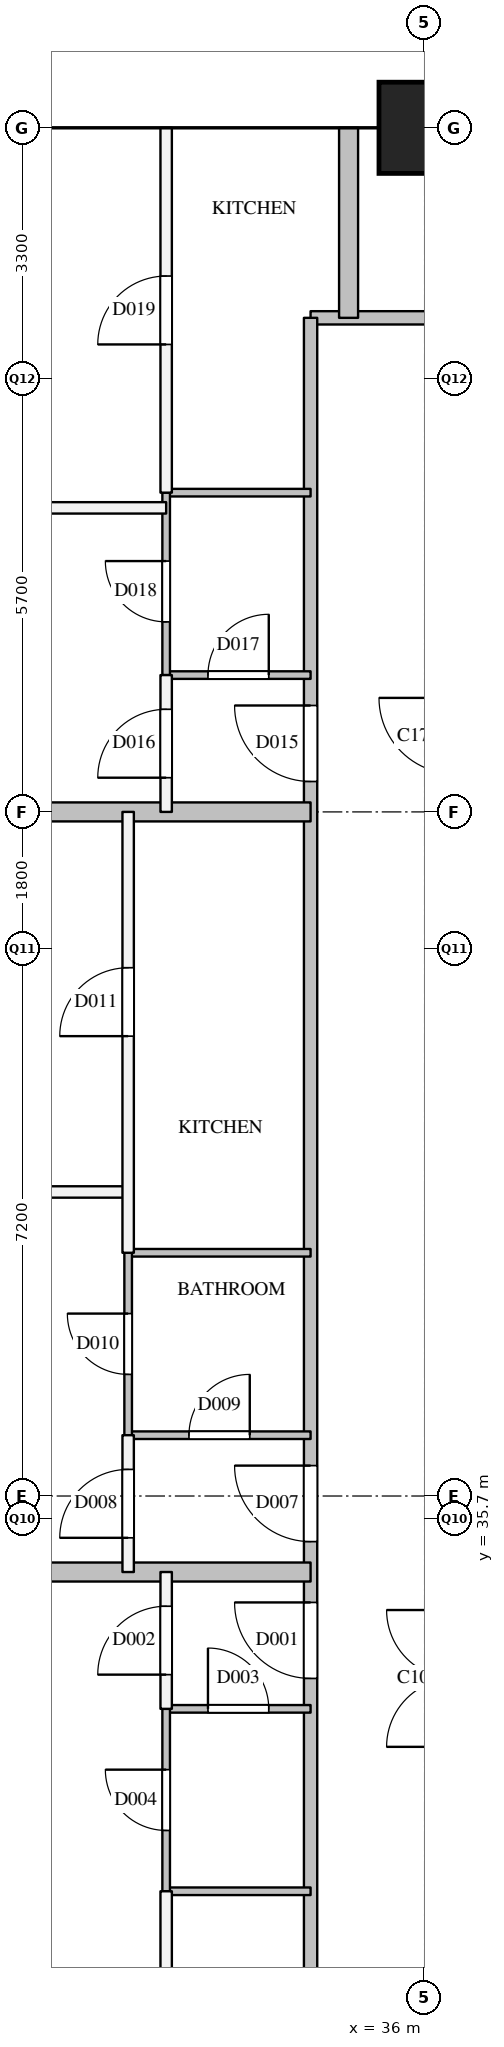
"""IFC4 building model, lengths in metres.
Left out: names, types, materials, properties, quantities, classifications, styles, units other than length and angle.
Written with IfcOpenShell. Run it as: python <this file> out.ifc"""

import sys

from ifc_helpers import new_model, si_unit, direction, frame, frame_2d, origin, origin_2d, place, context, subcontext, project, spatial, rectangle, extrude, element, fill, save


model = new_model("IFC4")
c1 = context("Model", 3, precision=1e-05, world=origin(), true_north=direction((0.0, 1.0)))
c2 = subcontext(c1, "Body", "Model", "MODEL_VIEW")
j1 = project(units=[si_unit("LENGTHUNIT", "METRE"), si_unit("PLANEANGLEUNIT", "RADIAN")], contexts=[c1])
p1 = place(None, origin())
s1 = spatial("IfcSite", under=j1, at=p1, CompositionType="ELEMENT")
p2 = place(p1, origin())
s2 = spatial("IfcBuilding", under=s1, at=p2, CompositionType="ELEMENT")
p3 = place(p2, frame((0.0, 0.0, 234.5)))
s3 = spatial("IfcBuildingStorey", under=s2, at=p3, CompositionType="ELEMENT", Elevation=234.5)
p4 = place(p3, frame((36.0, 54.0, 0.0), z_axis=(0.0, 0.0, 1.0), x_axis=(1.0, 0.0, 0.0)))
e1 = element("IfcColumn", 1, at=p4, inside=s3, PredefinedType="COLUMN", context=c2, shape_type="SweptSolid", body=[
    extrude(rectangle(XDim=1.2, YDim=1.2, at=origin_2d()), origin(), (0.0, 0.0, 1.0), 3.9),
])
p5 = place(p3, frame((34.5, 51.5, 0.0), z_axis=(0.0, 0.0, 1.0), x_axis=(1.0, 0.0, 0.0)))
e2 = element("IfcWall", 2, at=p5, inside=s3, PredefinedType="PARTITIONING", context=c2, shape_type="SweptSolid", body=[
    extrude(rectangle(XDim=15.4, YDim=0.175, at=frame_2d((7.7, 0.0))), origin(), (0.0, 0.0, 1.0), 3.6),
])
p6 = place(p5, frame((12.45, 0.0, 0.0)))
e3 = element("IfcOpeningElement", 3, at=p6, cuts=e2, PredefinedType="OPENING", context=c2, shape_type="SweptSolid", body=[
    extrude(rectangle(XDim=1.0, YDim=2.1, at=frame_2d((0.5, 1.05))), frame((0.0, 0.097, 0.0), z_axis=(0.0, -1.0, 0.0), x_axis=(1.0, 0.0, 0.0)), (0.0, 0.0, 1.0), 0.195),
])
p7 = place(p5, frame((5.05, 0.0, 0.0)))
e4 = element("IfcOpeningElement", 4, at=p7, cuts=e2, PredefinedType="OPENING", context=c2, shape_type="SweptSolid", body=[
    extrude(rectangle(XDim=0.9, YDim=2.1, at=frame_2d((0.45, 1.05))), frame((0.0, 0.097, 0.0), z_axis=(0.0, -1.0, 0.0), x_axis=(1.0, 0.0, 0.0)), (0.0, 0.0, 1.0), 0.195),
])
p8 = place(p3, frame((34.5, 28.5, 0.0), z_axis=(0.0, 0.0, 1.0), x_axis=(0.0, 1.0, 0.0)))
e5 = element("IfcWall", 5, at=p8, inside=s3, PredefinedType="PARTITIONING", context=c2, shape_type="SweptSolid", body=[
    extrude(rectangle(XDim=23.0, YDim=0.175, at=frame_2d((11.5, 0.0))), origin(), (0.0, 0.0, 1.0), 3.6),
])
p9 = place(p8, frame((5.1, 0.0, 0.0)))
e6 = element("IfcOpeningElement", 6, at=p9, cuts=e5, PredefinedType="OPENING", context=c2, shape_type="SweptSolid", body=[
    extrude(rectangle(XDim=1.0, YDim=2.1, at=frame_2d((0.5, 1.05))), frame((0.0, 0.097, 0.0), z_axis=(0.0, -1.0, 0.0), x_axis=(1.0, 0.0, 0.0)), (0.0, 0.0, 1.0), 0.195),
])
p10 = place(p8, frame((6.9, 0.0, 0.0)))
e7 = element("IfcOpeningElement", 7, at=p10, cuts=e5, PredefinedType="OPENING", context=c2, shape_type="SweptSolid", body=[
    extrude(rectangle(XDim=1.0, YDim=2.1, at=frame_2d((0.5, 1.05))), frame((0.0, 0.097, 0.0), z_axis=(0.0, -1.0, 0.0), x_axis=(1.0, 0.0, 0.0)), (0.0, 0.0, 1.0), 0.195),
])
p11 = place(p8, frame((16.9, 0.0, 0.0)))
e8 = element("IfcOpeningElement", 8, at=p11, cuts=e5, PredefinedType="OPENING", context=c2, shape_type="SweptSolid", body=[
    extrude(rectangle(XDim=1.0, YDim=2.1, at=frame_2d((0.5, 1.05))), frame((0.0, 0.097, 0.0), z_axis=(0.0, -1.0, 0.0), x_axis=(1.0, 0.0, 0.0)), (0.0, 0.0, 1.0), 0.195),
])
p12 = place(p3, frame((18.025, 40.0, 0.0), z_axis=(0.0, 0.0, 1.0), x_axis=(1.0, 0.0, 0.0)))
e9 = element("IfcWall", 9, at=p12, inside=s3, PredefinedType="PARTITIONING", context=c2, shape_type="SweptSolid", body=[
    extrude(rectangle(XDim=14.075, YDim=0.15, at=frame_2d((7.037, 0.0))), origin(), (0.0, 0.0, 1.0), 2.6),
])
p13 = place(p12, frame((9.888, 0.0, 0.0)))
e10 = element("IfcOpeningElement", 10, at=p13, cuts=e9, PredefinedType="OPENING", context=c2, shape_type="SweptSolid", body=[
    extrude(rectangle(XDim=0.9, YDim=2.1, at=frame_2d((0.45, 1.05))), frame((0.0, 0.085, 0.0), z_axis=(0.0, -1.0, 0.0), x_axis=(1.0, 0.0, 0.0)), (0.0, 0.0, 1.0), 0.17),
])
p14 = place(p12, frame((2.838, 0.0, 0.0)))
e11 = element("IfcOpeningElement", 11, at=p14, cuts=e9, PredefinedType="OPENING", context=c2, shape_type="SweptSolid", body=[
    extrude(rectangle(XDim=0.9, YDim=2.1, at=frame_2d((0.45, 1.05))), frame((0.0, 0.085, 0.0), z_axis=(0.0, -1.0, 0.0), x_axis=(1.0, 0.0, 0.0)), (0.0, 0.0, 1.0), 0.17),
])
p15 = place(p3, frame((18.0, 49.0, 0.0), z_axis=(0.0, 0.0, 1.0), x_axis=(1.0, 0.0, 0.0)))
e12 = element("IfcWall", 12, at=p15, inside=s3, PredefinedType="PARTITIONING", context=c2, shape_type="SweptSolid", body=[
    extrude(rectangle(XDim=14.6, YDim=0.15, at=frame_2d((7.3, 0.0))), origin(), (0.0, 0.0, 1.0), 2.6),
])
p16 = place(p15, frame((10.533, 0.0, 0.0)))
e13 = element("IfcOpeningElement", 13, at=p16, cuts=e12, PredefinedType="OPENING", context=c2, shape_type="SweptSolid", body=[
    extrude(rectangle(XDim=0.9, YDim=2.1, at=frame_2d((0.45, 1.05))), frame((0.0, 0.085, 0.0), z_axis=(0.0, -1.0, 0.0), x_axis=(1.0, 0.0, 0.0)), (0.0, 0.0, 1.0), 0.17),
])
p17 = place(p15, frame((3.233, 0.0, 0.0)))
e14 = element("IfcOpeningElement", 14, at=p17, cuts=e12, PredefinedType="OPENING", context=c2, shape_type="SweptSolid", body=[
    extrude(rectangle(XDim=0.9, YDim=2.1, at=frame_2d((0.45, 1.05))), frame((0.0, 0.085, 0.0), z_axis=(0.0, -1.0, 0.0), x_axis=(1.0, 0.0, 0.0)), (0.0, 0.0, 1.0), 0.17),
])
p18 = place(p3, frame((32.1, 35.0, 0.0), z_axis=(0.0, 0.0, 1.0), x_axis=(0.0, 1.0, 0.0)))
e15 = element("IfcWall", 15, at=p18, inside=s3, PredefinedType="PARTITIONING", context=c2, shape_type="SweptSolid", body=[
    extrude(rectangle(XDim=1.8, YDim=0.15, at=frame_2d((0.9, 0.0))), origin(), (0.0, 0.0, 1.0), 3.6),
])
p19 = place(p18, frame((0.45, 0.0, 0.0)))
e16 = element("IfcOpeningElement", 16, at=p19, cuts=e15, PredefinedType="OPENING", context=c2, shape_type="SweptSolid", body=[
    extrude(rectangle(XDim=0.9, YDim=2.1, at=frame_2d((0.45, 1.05))), frame((0.0, 0.085, 0.0), z_axis=(0.0, -1.0, 0.0), x_axis=(1.0, 0.0, 0.0)), (0.0, 0.0, 1.0), 0.17),
])
p20 = place(p3, frame((32.1, 39.2, 0.0), z_axis=(0.0, 0.0, 1.0), x_axis=(0.0, 1.0, 0.0)))
e17 = element("IfcWall", 17, at=p20, inside=s3, PredefinedType="PARTITIONING", context=c2, shape_type="SweptSolid", body=[
    extrude(rectangle(XDim=5.8, YDim=0.15, at=frame_2d((2.9, 0.0))), origin(), (0.0, 0.0, 1.0), 3.6),
])
p21 = place(p20, frame((2.85, 0.0, 0.0)))
e18 = element("IfcOpeningElement", 18, at=p21, cuts=e17, PredefinedType="OPENING", context=c2, shape_type="SweptSolid", body=[
    extrude(rectangle(XDim=0.9, YDim=2.1, at=frame_2d((0.45, 1.05))), frame((0.0, 0.085, 0.0), z_axis=(0.0, -1.0, 0.0), x_axis=(1.0, 0.0, 0.0)), (0.0, 0.0, 1.0), 0.17),
])
p22 = place(p3, frame((32.6, 27.0, 0.0), z_axis=(0.0, 0.0, 1.0), x_axis=(0.0, 1.0, 0.0)))
e19 = element("IfcWall", 19, at=p22, inside=s3, PredefinedType="PARTITIONING", context=c2, shape_type="SweptSolid", body=[
    extrude(rectangle(XDim=3.8, YDim=0.15, at=frame_2d((1.9, 0.0))), origin(), (0.0, 0.0, 1.0), 2.6),
])
p23 = place(p22, frame((1.45, 0.0, 0.0)))
e20 = element("IfcOpeningElement", 20, at=p23, cuts=e19, PredefinedType="OPENING", context=c2, shape_type="SweptSolid", body=[
    extrude(rectangle(XDim=0.9, YDim=2.1, at=frame_2d((0.45, 1.05))), frame((0.0, 0.085, 0.0), z_axis=(0.0, -1.0, 0.0), x_axis=(1.0, 0.0, 0.0)), (0.0, 0.0, 1.0), 0.17),
])
p24 = place(p3, frame((32.6, 33.2, 0.0), z_axis=(0.0, 0.0, 1.0), x_axis=(0.0, 1.0, 0.0)))
e21 = element("IfcWall", 21, at=p24, inside=s3, PredefinedType="PARTITIONING", context=c2, shape_type="SweptSolid", body=[
    extrude(rectangle(XDim=1.8, YDim=0.15, at=frame_2d((0.9, 0.0))), origin(), (0.0, 0.0, 1.0), 3.6),
])
p25 = place(p24, frame((0.45, 0.0, 0.0)))
e22 = element("IfcOpeningElement", 22, at=p25, cuts=e21, PredefinedType="OPENING", context=c2, shape_type="SweptSolid", body=[
    extrude(rectangle(XDim=0.9, YDim=2.1, at=frame_2d((0.45, 1.05))), frame((0.0, 0.085, 0.0), z_axis=(0.0, -1.0, 0.0), x_axis=(1.0, 0.0, 0.0)), (0.0, 0.0, 1.0), 0.17),
])
p26 = place(p3, frame((32.6, 45.0, 0.0), z_axis=(0.0, 0.0, 1.0), x_axis=(0.0, 1.0, 0.0)))
e23 = element("IfcWall", 23, at=p26, inside=s3, PredefinedType="PARTITIONING", context=c2, shape_type="SweptSolid", body=[
    extrude(rectangle(XDim=1.8, YDim=0.15, at=frame_2d((0.9, 0.0))), origin(), (0.0, 0.0, 1.0), 3.6),
])
p27 = place(p26, frame((0.45, 0.0, 0.0)))
e24 = element("IfcOpeningElement", 24, at=p27, cuts=e23, PredefinedType="OPENING", context=c2, shape_type="SweptSolid", body=[
    extrude(rectangle(XDim=0.9, YDim=2.1, at=frame_2d((0.45, 1.05))), frame((0.0, 0.085, 0.0), z_axis=(0.0, -1.0, 0.0), x_axis=(1.0, 0.0, 0.0)), (0.0, 0.0, 1.0), 0.17),
])
p28 = place(p3, frame((32.6, 49.2, 0.0), z_axis=(0.0, 0.0, 1.0), x_axis=(0.0, 1.0, 0.0)))
e25 = element("IfcWall", 25, at=p28, inside=s3, PredefinedType="PARTITIONING", context=c2, shape_type="SweptSolid", body=[
    extrude(rectangle(XDim=4.8, YDim=0.15, at=frame_2d((2.4, 0.0))), origin(), (0.0, 0.0, 1.0), 2.6),
])
p29 = place(p28, frame((1.95, 0.0, 0.0)))
e26 = element("IfcOpeningElement", 26, at=p29, cuts=e25, PredefinedType="OPENING", context=c2, shape_type="SweptSolid", body=[
    extrude(rectangle(XDim=0.9, YDim=2.1, at=frame_2d((0.45, 1.05))), frame((0.0, 0.085, 0.0), z_axis=(0.0, -1.0, 0.0), x_axis=(1.0, 0.0, 0.0)), (0.0, 0.0, 1.0), 0.17),
])
p30 = place(p3, frame((18.0, 35.0, 0.0), z_axis=(0.0, 0.0, 1.0), x_axis=(1.0, 0.0, 0.0)))
e27 = element("IfcWall", 27, at=p30, inside=s3, PredefinedType="PARTITIONING", context=c2, shape_type="SweptSolid", body=[
    extrude(rectangle(XDim=16.5, YDim=0.25, at=frame_2d((8.25, 0.0))), origin(), (0.0, 0.0, 1.0), 2.6),
])
p31 = place(p3, frame((18.0, 45.0, 0.0), z_axis=(0.0, 0.0, 1.0), x_axis=(1.0, 0.0, 0.0)))
e28 = element("IfcWall", 28, at=p31, inside=s3, PredefinedType="PARTITIONING", context=c2, shape_type="SweptSolid", body=[
    extrude(rectangle(XDim=16.5, YDim=0.25, at=frame_2d((8.25, 0.0))), origin(), (0.0, 0.0, 1.0), 3.6),
])
p32 = place(p3, frame((35.0, 51.5, 0.0), z_axis=(0.0, 0.0, 1.0), x_axis=(0.0, 1.0, 0.0)))
e29 = element("IfcWall", 29, at=p32, inside=s3, PredefinedType="PARTITIONING", context=c2, shape_type="SweptSolid", body=[
    extrude(rectangle(XDim=2.5, YDim=0.25, at=frame_2d((1.25, 0.0))), origin(), (0.0, 0.0, 1.0), 2.6),
])
p33 = place(p3, frame((32.6, 30.8, 0.0), z_axis=(0.0, 0.0, 1.0), x_axis=(1.0, 0.0, 0.0)))
e30 = element("IfcWall", 30, at=p33, inside=s3, PredefinedType="PARTITIONING", context=c2, shape_type="SweptSolid", body=[
    extrude(rectangle(XDim=1.9, YDim=0.1, at=frame_2d((0.95, 0.0))), origin(), (0.0, 0.0, 1.0), 3.6),
])
p34 = place(p3, frame((32.6, 33.2, 0.0), z_axis=(0.0, 0.0, 1.0), x_axis=(1.0, 0.0, 0.0)))
e31 = element("IfcWall", 31, at=p34, inside=s3, PredefinedType="PARTITIONING", context=c2, shape_type="SweptSolid", body=[
    extrude(rectangle(XDim=1.9, YDim=0.1, at=frame_2d((0.95, 0.0))), origin(), (0.0, 0.0, 1.0), 3.6),
])
p35 = place(p34, frame((0.55, 0.0, 0.0)))
e32 = element("IfcOpeningElement", 32, at=p35, cuts=e31, PredefinedType="OPENING", context=c2, shape_type="SweptSolid", body=[
    extrude(rectangle(XDim=0.8, YDim=2.1, at=frame_2d((0.4, 1.05))), frame((0.0, 0.06, 0.0), z_axis=(0.0, -1.0, 0.0), x_axis=(1.0, 0.0, 0.0)), (0.0, 0.0, 1.0), 0.12),
])
p36 = place(p3, frame((32.1, 36.8, 0.0), z_axis=(0.0, 0.0, 1.0), x_axis=(1.0, 0.0, 0.0)))
e33 = element("IfcWall", 33, at=p36, inside=s3, PredefinedType="PARTITIONING", context=c2, shape_type="SweptSolid", body=[
    extrude(rectangle(XDim=2.4, YDim=0.1, at=frame_2d((1.2, 0.0))), origin(), (0.0, 0.0, 1.0), 3.6),
])
p37 = place(p36, frame((0.8, 0.0, 0.0)))
e34 = element("IfcOpeningElement", 34, at=p37, cuts=e33, PredefinedType="OPENING", context=c2, shape_type="SweptSolid", body=[
    extrude(rectangle(XDim=0.8, YDim=2.1, at=frame_2d((0.4, 1.05))), frame((0.0, 0.06, 0.0), z_axis=(0.0, -1.0, 0.0), x_axis=(1.0, 0.0, 0.0)), (0.0, 0.0, 1.0), 0.12),
])
p38 = place(p3, frame((32.1, 39.2, 0.0), z_axis=(0.0, 0.0, 1.0), x_axis=(1.0, 0.0, 0.0)))
e35 = element("IfcWall", 35, at=p38, inside=s3, PredefinedType="PARTITIONING", context=c2, shape_type="SweptSolid", body=[
    extrude(rectangle(XDim=2.4, YDim=0.1, at=frame_2d((1.2, 0.0))), origin(), (0.0, 0.0, 1.0), 3.6),
])
p39 = place(p3, frame((32.6, 46.8, 0.0), z_axis=(0.0, 0.0, 1.0), x_axis=(1.0, 0.0, 0.0)))
e36 = element("IfcWall", 36, at=p39, inside=s3, PredefinedType="PARTITIONING", context=c2, shape_type="SweptSolid", body=[
    extrude(rectangle(XDim=1.9, YDim=0.1, at=frame_2d((0.95, 0.0))), origin(), (0.0, 0.0, 1.0), 3.6),
])
p40 = place(p39, frame((0.55, 0.0, 0.0)))
e37 = element("IfcOpeningElement", 37, at=p40, cuts=e36, PredefinedType="OPENING", context=c2, shape_type="SweptSolid", body=[
    extrude(rectangle(XDim=0.8, YDim=2.1, at=frame_2d((0.4, 1.05))), frame((0.0, 0.06, 0.0), z_axis=(0.0, -1.0, 0.0), x_axis=(1.0, 0.0, 0.0)), (0.0, 0.0, 1.0), 0.12),
])
p41 = place(p3, frame((32.6, 49.2, 0.0), z_axis=(0.0, 0.0, 1.0), x_axis=(1.0, 0.0, 0.0)))
e38 = element("IfcWall", 38, at=p41, inside=s3, PredefinedType="PARTITIONING", context=c2, shape_type="SweptSolid", body=[
    extrude(rectangle(XDim=1.9, YDim=0.1, at=frame_2d((0.95, 0.0))), origin(), (0.0, 0.0, 1.0), 3.6),
])
p42 = place(p3, frame((32.1, 36.8, 0.0), z_axis=(0.0, 0.0, 1.0), x_axis=(0.0, 1.0, 0.0)))
e39 = element("IfcWall", 39, at=p42, inside=s3, PredefinedType="PARTITIONING", context=c2, shape_type="SweptSolid", body=[
    extrude(rectangle(XDim=2.4, YDim=0.1, at=frame_2d((1.2, 0.0))), origin(), (0.0, 0.0, 1.0), 3.6),
])
p43 = place(p42, frame((0.8, 0.0, 0.0)))
e40 = element("IfcOpeningElement", 40, at=p43, cuts=e39, PredefinedType="OPENING", context=c2, shape_type="SweptSolid", body=[
    extrude(rectangle(XDim=0.8, YDim=2.1, at=frame_2d((0.4, 1.05))), frame((0.0, 0.06, 0.0), z_axis=(0.0, -1.0, 0.0), x_axis=(1.0, 0.0, 0.0)), (0.0, 0.0, 1.0), 0.12),
])
p44 = place(p3, frame((32.6, 30.8, 0.0), z_axis=(0.0, 0.0, 1.0), x_axis=(0.0, 1.0, 0.0)))
e41 = element("IfcWall", 41, at=p44, inside=s3, PredefinedType="PARTITIONING", context=c2, shape_type="SweptSolid", body=[
    extrude(rectangle(XDim=2.4, YDim=0.1, at=frame_2d((1.2, 0.0))), origin(), (0.0, 0.0, 1.0), 3.6),
])
p45 = place(p44, frame((0.8, 0.0, 0.0)))
e42 = element("IfcOpeningElement", 42, at=p45, cuts=e41, PredefinedType="OPENING", context=c2, shape_type="SweptSolid", body=[
    extrude(rectangle(XDim=0.8, YDim=2.1, at=frame_2d((0.4, 1.05))), frame((0.0, 0.06, 0.0), z_axis=(0.0, -1.0, 0.0), x_axis=(1.0, 0.0, 0.0)), (0.0, 0.0, 1.0), 0.12),
])
p46 = place(p3, frame((32.6, 46.8, 0.0), z_axis=(0.0, 0.0, 1.0), x_axis=(0.0, 1.0, 0.0)))
e43 = element("IfcWall", 43, at=p46, inside=s3, PredefinedType="PARTITIONING", context=c2, shape_type="SweptSolid", body=[
    extrude(rectangle(XDim=2.4, YDim=0.1, at=frame_2d((1.2, 0.0))), origin(), (0.0, 0.0, 1.0), 3.6),
])
p47 = place(p46, frame((0.7, 0.0, 0.0)))
e44 = element("IfcOpeningElement", 44, at=p47, cuts=e43, PredefinedType="OPENING", context=c2, shape_type="SweptSolid", body=[
    extrude(rectangle(XDim=0.8, YDim=2.1, at=frame_2d((0.4, 1.05))), frame((0.0, 0.06, 0.0), z_axis=(0.0, -1.0, 0.0), x_axis=(1.0, 0.0, 0.0)), (0.0, 0.0, 1.0), 0.12),
])
p48 = place(p9, origin())
e45 = element("IfcDoor", 45, at=p48, inside=s3, OperationType="SINGLE_SWING_RIGHT", PredefinedType="DOOR", context=c2, shape_type="SweptSolid", body=[
    extrude(rectangle(XDim=1.0, YDim=2.1, at=frame_2d((0.5, 1.05))), frame((0.0, 0.025, 0.0), z_axis=(0.0, -1.0, 0.0), x_axis=(1.0, 0.0, 0.0)), (0.0, 0.0, 1.0), 0.05),
])
fill(e6, e45)
p49 = place(p25, origin())
e46 = element("IfcDoor", 46, at=p49, inside=s3, OperationType="SINGLE_SWING_LEFT", PredefinedType="DOOR", context=c2, shape_type="SweptSolid", body=[
    extrude(rectangle(XDim=0.9, YDim=2.1, at=frame_2d((0.45, 1.05))), frame((0.0, 0.025, 0.0), z_axis=(0.0, -1.0, 0.0), x_axis=(1.0, 0.0, 0.0)), (0.0, 0.0, 1.0), 0.05),
])
fill(e22, e46)
p50 = place(p35, origin())
e47 = element("IfcDoor", 47, at=p50, inside=s3, OperationType="SINGLE_SWING_LEFT", PredefinedType="DOOR", context=c2, shape_type="SweptSolid", body=[
    extrude(rectangle(XDim=0.8, YDim=2.1, at=frame_2d((0.4, 1.05))), frame((0.0, 0.025, 0.0), z_axis=(0.0, -1.0, 0.0), x_axis=(1.0, 0.0, 0.0)), (0.0, 0.0, 1.0), 0.05),
])
fill(e32, e47)
p51 = place(p45, origin())
e48 = element("IfcDoor", 48, at=p51, inside=s3, OperationType="SINGLE_SWING_RIGHT", PredefinedType="DOOR", context=c2, shape_type="SweptSolid", body=[
    extrude(rectangle(XDim=0.8, YDim=2.1, at=frame_2d((0.4, 1.05))), frame((0.0, 0.025, 0.0), z_axis=(0.0, -1.0, 0.0), x_axis=(1.0, 0.0, 0.0)), (0.0, 0.0, 1.0), 0.05),
])
fill(e42, e48)
p52 = place(p10, origin())
e49 = element("IfcDoor", 49, at=p52, inside=s3, OperationType="SINGLE_SWING_RIGHT", PredefinedType="DOOR", context=c2, shape_type="SweptSolid", body=[
    extrude(rectangle(XDim=1.0, YDim=2.1, at=frame_2d((0.5, 1.05))), frame((0.0, 0.025, 0.0), z_axis=(0.0, -1.0, 0.0), x_axis=(1.0, 0.0, 0.0)), (0.0, 0.0, 1.0), 0.05),
])
fill(e7, e49)
p53 = place(p19, origin())
e50 = element("IfcDoor", 50, at=p53, inside=s3, OperationType="SINGLE_SWING_LEFT", PredefinedType="DOOR", context=c2, shape_type="SweptSolid", body=[
    extrude(rectangle(XDim=0.9, YDim=2.1, at=frame_2d((0.45, 1.05))), frame((0.0, 0.025, 0.0), z_axis=(0.0, -1.0, 0.0), x_axis=(1.0, 0.0, 0.0)), (0.0, 0.0, 1.0), 0.05),
])
fill(e16, e50)
p54 = place(p37, origin())
e51 = element("IfcDoor", 51, at=p54, inside=s3, OperationType="SINGLE_SWING_RIGHT", PredefinedType="DOOR", context=c2, shape_type="SweptSolid", body=[
    extrude(rectangle(XDim=0.8, YDim=2.1, at=frame_2d((0.4, 1.05))), frame((0.0, 0.025, 0.0), z_axis=(0.0, -1.0, 0.0), x_axis=(1.0, 0.0, 0.0)), (0.0, 0.0, 1.0), 0.05),
])
fill(e34, e51)
p55 = place(p43, origin())
e52 = element("IfcDoor", 52, at=p55, inside=s3, OperationType="SINGLE_SWING_RIGHT", PredefinedType="DOOR", context=c2, shape_type="SweptSolid", body=[
    extrude(rectangle(XDim=0.8, YDim=2.1, at=frame_2d((0.4, 1.05))), frame((0.0, 0.025, 0.0), z_axis=(0.0, -1.0, 0.0), x_axis=(1.0, 0.0, 0.0)), (0.0, 0.0, 1.0), 0.05),
])
fill(e40, e52)
p56 = place(p21, origin())
e53 = element("IfcDoor", 53, at=p56, inside=s3, OperationType="SINGLE_SWING_LEFT", PredefinedType="DOOR", context=c2, shape_type="SweptSolid", body=[
    extrude(rectangle(XDim=0.9, YDim=2.1, at=frame_2d((0.45, 1.05))), frame((0.0, 0.025, 0.0), z_axis=(0.0, -1.0, 0.0), x_axis=(1.0, 0.0, 0.0)), (0.0, 0.0, 1.0), 0.05),
])
fill(e18, e53)
p57 = place(p11, origin())
e54 = element("IfcDoor", 54, at=p57, inside=s3, OperationType="SINGLE_SWING_RIGHT", PredefinedType="DOOR", context=c2, shape_type="SweptSolid", body=[
    extrude(rectangle(XDim=1.0, YDim=2.1, at=frame_2d((0.5, 1.05))), frame((0.0, 0.025, 0.0), z_axis=(0.0, -1.0, 0.0), x_axis=(1.0, 0.0, 0.0)), (0.0, 0.0, 1.0), 0.05),
])
fill(e8, e54)
p58 = place(p27, origin())
e55 = element("IfcDoor", 55, at=p58, inside=s3, OperationType="SINGLE_SWING_LEFT", PredefinedType="DOOR", context=c2, shape_type="SweptSolid", body=[
    extrude(rectangle(XDim=0.9, YDim=2.1, at=frame_2d((0.45, 1.05))), frame((0.0, 0.025, 0.0), z_axis=(0.0, -1.0, 0.0), x_axis=(1.0, 0.0, 0.0)), (0.0, 0.0, 1.0), 0.05),
])
fill(e24, e55)
p59 = place(p40, origin())
e56 = element("IfcDoor", 56, at=p59, inside=s3, OperationType="SINGLE_SWING_RIGHT", PredefinedType="DOOR", context=c2, shape_type="SweptSolid", body=[
    extrude(rectangle(XDim=0.8, YDim=2.1, at=frame_2d((0.4, 1.05))), frame((0.0, 0.025, 0.0), z_axis=(0.0, -1.0, 0.0), x_axis=(1.0, 0.0, 0.0)), (0.0, 0.0, 1.0), 0.05),
])
fill(e37, e56)
p60 = place(p47, origin())
e57 = element("IfcDoor", 57, at=p60, inside=s3, OperationType="SINGLE_SWING_RIGHT", PredefinedType="DOOR", context=c2, shape_type="SweptSolid", body=[
    extrude(rectangle(XDim=0.8, YDim=2.1, at=frame_2d((0.4, 1.05))), frame((0.0, 0.025, 0.0), z_axis=(0.0, -1.0, 0.0), x_axis=(1.0, 0.0, 0.0)), (0.0, 0.0, 1.0), 0.05),
])
fill(e44, e57)
p61 = place(p29, origin())
e58 = element("IfcDoor", 58, at=p61, inside=s3, OperationType="SINGLE_SWING_LEFT", PredefinedType="DOOR", context=c2, shape_type="SweptSolid", body=[
    extrude(rectangle(XDim=0.9, YDim=2.1, at=frame_2d((0.45, 1.05))), frame((0.0, 0.025, 0.0), z_axis=(0.0, -1.0, 0.0), x_axis=(1.0, 0.0, 0.0)), (0.0, 0.0, 1.0), 0.05),
])
fill(e26, e58)
save(model, sys.argv[1])
